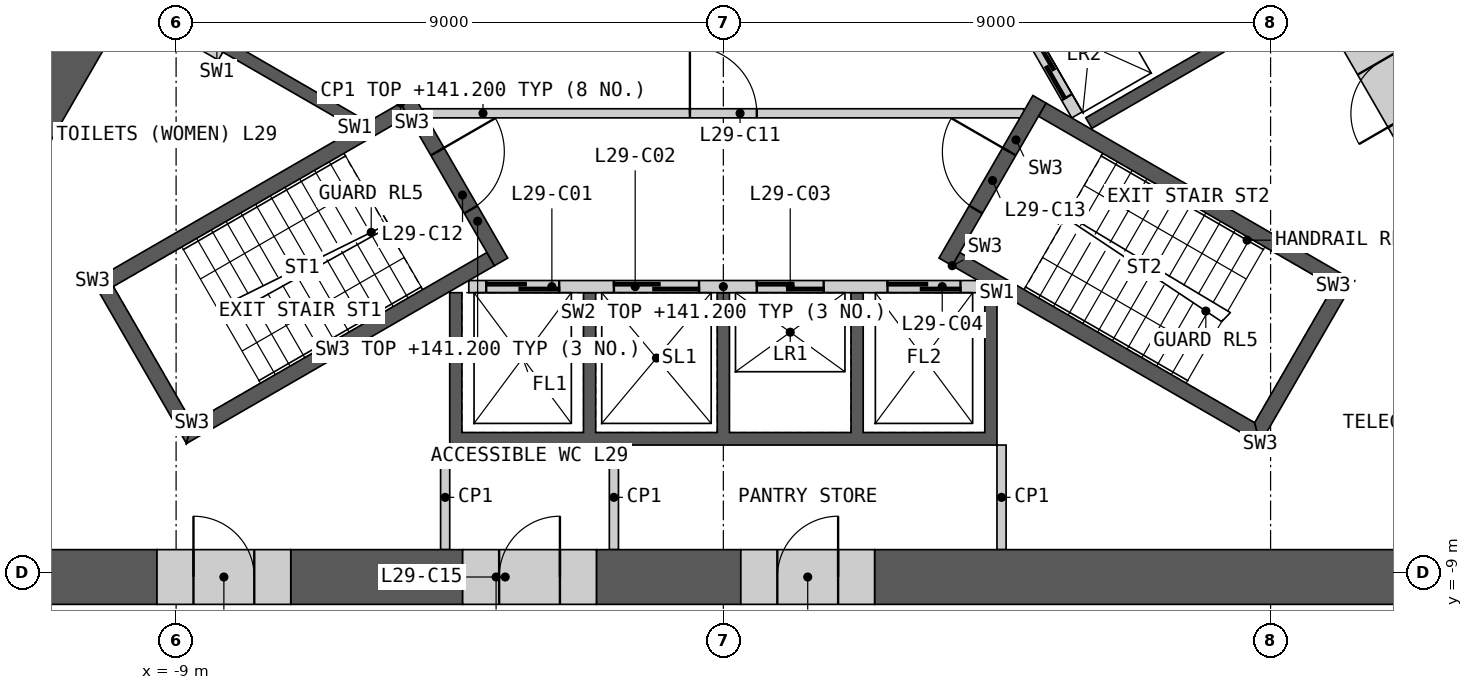
"""IFC4 building model, lengths in metres.
Left out: names, types, materials, properties, quantities, classifications, styles, units other than length and angle.
Written with IfcOpenShell. Run it as: python <this file> out.ifc"""

import sys

from ifc_helpers import new_model, si_unit, direction, frame, frame_2d, origin, place, context, subcontext, project, spatial, polyline, rectangle, outline, extrude, element, fill, save


model = new_model("IFC4")
c1 = context("Model", 3, precision=1e-05, world=origin(), true_north=direction((0.0, 1.0)))
c2 = subcontext(c1, "Body", "Model", "MODEL_VIEW")
j1 = project(units=[si_unit("LENGTHUNIT", "METRE"), si_unit("PLANEANGLEUNIT", "RADIAN")], contexts=[c1])
p1 = place(None, origin())
s1 = spatial("IfcSite", under=j1, at=p1, CompositionType="ELEMENT")
p2 = place(p1, origin())
s2 = spatial("IfcBuilding", under=s1, at=p2, CompositionType="ELEMENT")
p3 = place(p2, frame((0.0, 0.0, 137.4)))
s3 = spatial("IfcBuildingStorey", under=s2, at=p3, CompositionType="ELEMENT", Elevation=137.4)
p4 = place(p3, origin())
e1 = element("IfcWall", 1, at=p4, inside=s3, PredefinedType="SHEAR", context=c2, shape_type="SweptSolid", body=[
    extrude(outline(polyline([(4.5, -4.4), (4.5, -6.906), (-4.5, -6.906), (-4.5, -4.4), (-4.3, -4.4), (-4.3, -6.7), (-2.3, -6.7), (-2.3, -4.4), (-2.1, -4.4), (-2.1, -6.7), (-0.1, -6.7), (-0.1, -4.4), (0.1, -4.4), (0.1, -6.7), (2.1, -6.7), (2.1, -4.4), (2.3, -4.4), (2.3, -6.7), (4.3, -6.7), (4.3, -4.4), (4.5, -4.4)])), origin(), (0.0, 0.0, 1.0), 3.8),
])
p5 = place(p3, frame((-4.187, -4.3, 0.0), z_axis=(0.0, 0.0, 1.0), x_axis=(1.0, 0.0, 0.0)))
e2 = element("IfcWall", 2, at=p5, inside=s3, PredefinedType="SOLIDWALL", context=c2, shape_type="SweptSolid", body=[
    extrude(rectangle(XDim=8.373, YDim=0.2, at=frame_2d((4.187, 0.0))), origin(), (0.0, 0.0, 1.0), 3.8),
])
p6 = place(p5, frame((0.287, 0.0, 0.0)))
e3 = element("IfcOpeningElement", 3, at=p6, cuts=e2, PredefinedType="OPENING", context=c2, shape_type="SweptSolid", body=[
    extrude(rectangle(XDim=1.2, YDim=2.1, at=frame_2d((0.6, 1.05))), frame((0.0, 0.11, 0.0), z_axis=(0.0, -1.0, 0.0), x_axis=(1.0, 0.0, 0.0)), (0.0, 0.0, 1.0), 0.22),
])
p7 = place(p5, frame((2.387, 0.0, 0.0)))
e4 = element("IfcOpeningElement", 4, at=p7, cuts=e2, PredefinedType="OPENING", context=c2, shape_type="SweptSolid", body=[
    extrude(rectangle(XDim=1.4, YDim=2.1, at=frame_2d((0.7, 1.05))), frame((0.0, 0.11, 0.0), z_axis=(0.0, -1.0, 0.0), x_axis=(1.0, 0.0, 0.0)), (0.0, 0.0, 1.0), 0.22),
])
p8 = place(p5, frame((4.737, 0.0, 0.0)))
e5 = element("IfcOpeningElement", 5, at=p8, cuts=e2, PredefinedType="OPENING", context=c2, shape_type="SweptSolid", body=[
    extrude(rectangle(XDim=1.1, YDim=2.1, at=frame_2d((0.55, 1.05))), frame((0.0, 0.11, 0.0), z_axis=(0.0, -1.0, 0.0), x_axis=(1.0, 0.0, 0.0)), (0.0, 0.0, 1.0), 0.22),
])
p9 = place(p5, frame((6.887, 0.0, 0.0)))
e6 = element("IfcOpeningElement", 6, at=p9, cuts=e2, PredefinedType="OPENING", context=c2, shape_type="SweptSolid", body=[
    extrude(rectangle(XDim=1.2, YDim=2.1, at=frame_2d((0.6, 1.05))), frame((0.0, 0.11, 0.0), z_axis=(0.0, -1.0, 0.0), x_axis=(1.0, 0.0, 0.0)), (0.0, 0.0, 1.0), 0.22),
])
p10 = place(p3, origin())
e7 = element("IfcWall", 7, at=p10, inside=s3, PredefinedType="SHEAR", context=c2, shape_type="SweptSolid", body=[
    extrude(outline(polyline([(2.66, 4.192), (4.831, 5.445), (8.231, -0.444), (6.061, -1.697), (5.96, -1.524), (7.952, -0.374), (6.952, 1.358), (4.96, 0.208), (4.861, 0.381), (6.852, 1.531), (5.852, 3.263), (3.861, 2.113), (3.76, 2.287), (5.752, 3.437), (4.752, 5.169), (2.76, 4.019), (2.66, 4.192)])), origin(), (0.0, 0.0, 1.0), 3.8),
])
p11 = place(p3, frame((5.817, -1.476, 0.0), z_axis=(0.0, 0.0, 1.0), x_axis=(-0.500002616675, 0.866023893041, 0.0)))
e8 = element("IfcWall", 8, at=p11, inside=s3, PredefinedType="SOLIDWALL", context=c2, shape_type="SweptSolid", body=[
    extrude(rectangle(XDim=8.373, YDim=0.2, at=frame_2d((4.187, 0.0))), origin(), (0.0, 0.0, 1.0), 3.8),
])
p12 = place(p11, frame((0.337, 0.0, 0.0)))
e9 = element("IfcOpeningElement", 9, at=p12, cuts=e8, PredefinedType="OPENING", context=c2, shape_type="SweptSolid", body=[
    extrude(rectangle(XDim=1.1, YDim=2.1, at=frame_2d((0.55, 1.05))), frame((0.0, 0.11, 0.0), z_axis=(0.0, -1.0, 0.0), x_axis=(1.0, 0.0, 0.0)), (0.0, 0.0, 1.0), 0.22),
])
p13 = place(p11, frame((2.537, 0.0, 0.0)))
e10 = element("IfcOpeningElement", 10, at=p13, cuts=e8, PredefinedType="OPENING", context=c2, shape_type="SweptSolid", body=[
    extrude(rectangle(XDim=1.1, YDim=2.1, at=frame_2d((0.55, 1.05))), frame((0.0, 0.11, 0.0), z_axis=(0.0, -1.0, 0.0), x_axis=(1.0, 0.0, 0.0)), (0.0, 0.0, 1.0), 0.22),
])
p14 = place(p11, frame((4.737, 0.0, 0.0)))
e11 = element("IfcOpeningElement", 11, at=p14, cuts=e8, PredefinedType="OPENING", context=c2, shape_type="SweptSolid", body=[
    extrude(rectangle(XDim=1.1, YDim=2.1, at=frame_2d((0.55, 1.05))), frame((0.0, 0.11, 0.0), z_axis=(0.0, -1.0, 0.0), x_axis=(1.0, 0.0, 0.0)), (0.0, 0.0, 1.0), 0.22),
])
p15 = place(p11, frame((7.037, 0.0, 0.0)))
e12 = element("IfcOpeningElement", 12, at=p15, cuts=e8, PredefinedType="OPENING", context=c2, shape_type="SweptSolid", body=[
    extrude(rectangle(XDim=0.9, YDim=2.1, at=frame_2d((0.45, 1.05))), frame((0.0, 0.11, 0.0), z_axis=(0.0, -1.0, 0.0), x_axis=(1.0, 0.0, 0.0)), (0.0, 0.0, 1.0), 0.22),
])
p16 = place(p3, origin())
e13 = element("IfcWall", 13, at=p16, inside=s3, PredefinedType="SHEAR", context=c2, shape_type="SweptSolid", body=[
    extrude(outline(polyline([(-6.061, -1.697), (-8.231, -0.444), (-8.131, -0.271), (-5.96, -1.524), (-6.061, -1.697)])), origin(), (0.0, 0.0, 1.0), 3.8),
])
p17 = place(p3, frame((-4.941, -1.45, 0.0), z_axis=(0.0, 0.0, 1.0), x_axis=(1.0, 0.0, 0.0)))
e14 = element("IfcWall", 14, at=p17, inside=s3, PredefinedType="PARTITIONING", context=c2, shape_type="SweptSolid", body=[
    extrude(rectangle(XDim=9.882, YDim=0.15, at=frame_2d((4.941, 0.0))), origin(), (0.0, 0.0, 1.0), 3.8),
])
p18 = place(p17, frame((4.391, 0.0, 0.0)))
e15 = element("IfcOpeningElement", 15, at=p18, cuts=e14, PredefinedType="OPENING", context=c2, shape_type="SweptSolid", body=[
    extrude(rectangle(XDim=1.1, YDim=2.1, at=frame_2d((0.55, 1.05))), frame((0.0, 0.085, 0.0), z_axis=(0.0, -1.0, 0.0), x_axis=(1.0, 0.0, 0.0)), (0.0, 0.0, 1.0), 0.17),
])
p19 = place(p3, origin())
e16 = element("IfcWall", 16, at=p19, inside=s3, PredefinedType="SHEAR", context=c2, shape_type="SweptSolid", body=[
    extrude(outline(polyline([(-5.307, -1.281), (-10.374, -4.206), (-10.032, -4.298), (-5.182, -1.498), (-5.307, -1.281)])), origin(), (0.0, 0.0, 1.0), 3.8),
])
p20 = place(p3, origin())
e17 = element("IfcWall", 17, at=p20, inside=s3, PredefinedType="SHEAR", context=c2, shape_type="SweptSolid", body=[
    extrude(outline(polyline([(-10.374, -4.206), (-8.83, -6.881), (-8.738, -6.539), (-10.032, -4.298), (-10.374, -4.206)])), origin(), (0.0, 0.0, 1.0), 3.8),
])
p21 = place(p3, origin())
e18 = element("IfcWall", 18, at=p21, inside=s3, PredefinedType="SHEAR", context=c2, shape_type="SweptSolid", body=[
    extrude(outline(polyline([(-8.738, -6.539), (-8.83, -6.881), (-3.763, -3.956), (-3.888, -3.739), (-8.738, -6.539)])), origin(), (0.0, 0.0, 1.0), 3.8),
])
p22 = place(p3, frame((-5.199, -1.219, 0.0), z_axis=(0.0, 0.0, 1.0), x_axis=(0.499982516597, -0.866035497597, 0.0)))
e19 = element("IfcWall", 19, at=p22, inside=s3, PredefinedType="SHEAR", context=c2, shape_type="SweptSolid", body=[
    extrude(rectangle(XDim=3.088, YDim=0.25, at=frame_2d((1.544, 0.0))), origin(), (0.0, 0.0, 1.0), 3.8),
])
p23 = place(p22, frame((0.994, 0.0, 0.0)))
e20 = element("IfcOpeningElement", 20, at=p23, cuts=e19, PredefinedType="OPENING", context=c2, shape_type="SweptSolid", body=[
    extrude(rectangle(XDim=1.1, YDim=2.1, at=frame_2d((0.55, 1.05))), frame((0.0, 0.135, 0.0), z_axis=(0.0, -1.0, 0.0), x_axis=(1.0, 0.0, 0.0)), (0.0, 0.0, 1.0), 0.27),
])
p24 = place(p3, origin())
e21 = element("IfcWall", 21, at=p24, inside=s3, PredefinedType="SHEAR", context=c2, shape_type="SweptSolid", body=[
    extrude(outline(polyline([(3.763, -3.956), (8.83, -6.881), (8.738, -6.539), (3.888, -3.739), (3.763, -3.956)])), origin(), (0.0, 0.0, 1.0), 3.8),
])
p25 = place(p3, origin())
e22 = element("IfcWall", 22, at=p25, inside=s3, PredefinedType="SHEAR", context=c2, shape_type="SweptSolid", body=[
    extrude(outline(polyline([(8.83, -6.881), (10.374, -4.206), (10.032, -4.298), (8.738, -6.539), (8.83, -6.881)])), origin(), (0.0, 0.0, 1.0), 3.8),
])
p26 = place(p3, origin())
e23 = element("IfcWall", 23, at=p26, inside=s3, PredefinedType="SHEAR", context=c2, shape_type="SweptSolid", body=[
    extrude(outline(polyline([(10.032, -4.298), (10.374, -4.206), (5.307, -1.281), (5.182, -1.498), (10.032, -4.298)])), origin(), (0.0, 0.0, 1.0), 3.8),
])
p27 = place(p3, frame((3.655, -3.893, 0.0), z_axis=(0.0, 0.0, 1.0), x_axis=(0.499982516597, 0.866035497597, 0.0)))
e24 = element("IfcWall", 24, at=p27, inside=s3, PredefinedType="SHEAR", context=c2, shape_type="SweptSolid", body=[
    extrude(rectangle(XDim=3.088, YDim=0.25, at=frame_2d((1.544, 0.0))), origin(), (0.0, 0.0, 1.0), 3.8),
])
p28 = place(p27, frame((0.994, 0.0, 0.0)))
e25 = element("IfcOpeningElement", 25, at=p28, cuts=e24, PredefinedType="OPENING", context=c2, shape_type="SweptSolid", body=[
    extrude(rectangle(XDim=1.1, YDim=2.1, at=frame_2d((0.55, 1.05))), frame((0.0, 0.135, 0.0), z_axis=(0.0, -1.0, 0.0), x_axis=(1.0, 0.0, 0.0)), (0.0, 0.0, 1.0), 0.27),
])
for number, where, z_axis, x_axis in (
    (26, (-8.268, -0.509, 0.0), (0.0, 0.0, 1.0), (-0.866, 0.5, 0.0)),
    (27, (4.575, -6.906, 0.0), (0.0, 0.0, 1.0), (0.0, -1.0, 0.0)),
    (28, (-4.575, -6.906, 0.0), (0.0, 0.0, 1.0), (0.0, -1.0, 0.0)),
    (29, (-1.8, -8.626, 0.0), (0.0, 0.0, 1.0), (0.0, 1.0, 0.0)),
):
    element("IfcWall", number, at=place(p3, frame(where, z_axis=z_axis, x_axis=x_axis)), inside=s3, PredefinedType="PARTITIONING", context=c2, shape_type="SweptSolid", body=[
        extrude(rectangle(XDim=1.72, YDim=0.15, at=frame_2d((0.86, 0.0))), origin(), (0.0, 0.0, 1.0), 3.8),
    ])
p29 = place(p3, frame((2.488, -9.076, 0.0), z_axis=(0.0, 0.0, 1.0), x_axis=(1.0, 0.0, 0.0)))
e30 = element("IfcWall", 30, at=p29, inside=s3, PredefinedType="SHEAR", context=c2, shape_type="SweptSolid", body=[
    extrude(rectangle(XDim=12.454, YDim=0.9, at=frame_2d((6.227, 0.0))), origin(), (0.0, 0.0, 1.0), 3.8),
])
p30 = place(p3, frame((-14.941, -9.076, 0.0), z_axis=(0.0, 0.0, 1.0), x_axis=(1.0, 0.0, 0.0)))
e31 = element("IfcWall", 31, at=p30, inside=s3, PredefinedType="SHEAR", context=c2, shape_type="SweptSolid", body=[
    extrude(rectangle(XDim=5.627, YDim=0.9, at=frame_2d((2.813, 0.0))), origin(), (0.0, 0.0, 1.0), 3.8),
])
p31 = place(p3, frame((-7.115, -9.076, 0.0), z_axis=(0.0, 0.0, 1.0), x_axis=(1.0, 0.0, 0.0)))
e32 = element("IfcWall", 32, at=p31, inside=s3, PredefinedType="SHEAR", context=c2, shape_type="SweptSolid", body=[
    extrude(rectangle(XDim=2.827, YDim=0.9, at=frame_2d((1.414, 0.0))), origin(), (0.0, 0.0, 1.0), 3.8),
])
p32 = place(p3, frame((-2.087, -9.076, 0.0), z_axis=(0.0, 0.0, 1.0), x_axis=(1.0, 0.0, 0.0)))
e33 = element("IfcWall", 33, at=p32, inside=s3, PredefinedType="SHEAR", context=c2, shape_type="SweptSolid", body=[
    extrude(rectangle(XDim=2.375, YDim=0.9, at=frame_2d((1.188, 0.0))), origin(), (0.0, 0.0, 1.0), 3.8),
])
p33 = place(p3, frame((-10.06, 0.728, 0.0), z_axis=(0.0, 0.0, 1.0), x_axis=(-0.500002975332, -0.866023685969, 0.0)))
e34 = element("IfcWall", 34, at=p33, inside=s3, PredefinedType="SHEAR", context=c2, shape_type="SweptSolid", body=[
    extrude(rectangle(XDim=6.429, YDim=0.9, at=frame_2d((3.214, 0.0))), origin(), (0.0, 0.0, 1.0), 3.8),
])
p34 = place(p3, frame((-4.288, -9.076, 0.0), z_axis=(0.0, 0.0, 1.0), x_axis=(1.0, 0.0, 0.0)))
e35 = element("IfcWall", 35, at=p34, inside=s3, PredefinedType="SHEAR", context=c2, shape_type="SweptSolid", body=[
    extrude(rectangle(XDim=2.2, YDim=0.9, at=frame_2d((1.1, 0.0))), origin(), (0.0, 0.0, 1.0), 3.8),
])
p35 = place(p34, frame((0.6, 0.0, 0.0)))
e36 = element("IfcOpeningElement", 36, at=p35, cuts=e35, PredefinedType="OPENING", context=c2, shape_type="SweptSolid", body=[
    extrude(rectangle(XDim=1.0, YDim=2.1, at=frame_2d((0.5, 1.05))), frame((0.0, 0.46, 0.0), z_axis=(0.0, -1.0, 0.0), x_axis=(1.0, 0.0, 0.0)), (0.0, 0.0, 1.0), 0.92),
])
p36 = place(p3, frame((0.288, -9.076, 0.0), z_axis=(0.0, 0.0, 1.0), x_axis=(1.0, 0.0, 0.0)))
e37 = element("IfcWall", 37, at=p36, inside=s3, PredefinedType="SHEAR", context=c2, shape_type="SweptSolid", body=[
    extrude(rectangle(XDim=2.2, YDim=0.9, at=frame_2d((1.1, 0.0))), origin(), (0.0, 0.0, 1.0), 3.8),
])
p37 = place(p36, frame((0.6, 0.0, 0.0)))
e38 = element("IfcOpeningElement", 38, at=p37, cuts=e37, PredefinedType="OPENING", context=c2, shape_type="SweptSolid", body=[
    extrude(rectangle(XDim=1.0, YDim=2.1, at=frame_2d((0.5, 1.05))), frame((0.0, 0.46, 0.0), z_axis=(0.0, -1.0, 0.0), x_axis=(1.0, 0.0, 0.0)), (0.0, 0.0, 1.0), 0.92),
])
p38 = place(p3, frame((-9.314, -9.076, 0.0), z_axis=(0.0, 0.0, 1.0), x_axis=(1.0, 0.0, 0.0)))
e39 = element("IfcWall", 39, at=p38, inside=s3, PredefinedType="SHEAR", context=c2, shape_type="SweptSolid", body=[
    extrude(rectangle(XDim=2.2, YDim=0.9, at=frame_2d((1.1, 0.0))), origin(), (0.0, 0.0, 1.0), 3.8),
])
p39 = place(p38, frame((0.6, 0.0, 0.0)))
e40 = element("IfcOpeningElement", 40, at=p39, cuts=e39, PredefinedType="OPENING", context=c2, shape_type="SweptSolid", body=[
    extrude(rectangle(XDim=1.0, YDim=2.1, at=frame_2d((0.5, 1.05))), frame((0.0, 0.46, 0.0), z_axis=(0.0, -1.0, 0.0), x_axis=(1.0, 0.0, 0.0)), (0.0, 0.0, 1.0), 0.92),
])
p40 = place(p3, frame((11.621, -1.975, 0.0), z_axis=(0.0, 0.0, 1.0), x_axis=(-0.50002983664, 0.866008176907, 0.0)))
e41 = element("IfcWall", 41, at=p40, inside=s3, PredefinedType="SHEAR", context=c2, shape_type="SweptSolid", body=[
    extrude(rectangle(XDim=2.2, YDim=0.9, at=frame_2d((1.1, 0.0))), origin(), (0.0, 0.0, 1.0), 3.8),
])
p41 = place(p40, frame((0.6, 0.0, 0.0)))
e42 = element("IfcOpeningElement", 42, at=p41, cuts=e41, PredefinedType="OPENING", context=c2, shape_type="SweptSolid", body=[
    extrude(rectangle(XDim=1.0, YDim=2.1, at=frame_2d((0.5, 1.05))), frame((0.0, 0.46, 0.0), z_axis=(0.0, -1.0, 0.0), x_axis=(1.0, 0.0, 0.0)), (0.0, 0.0, 1.0), 0.92),
])
p42 = place(p3, frame((10.46, 5.736, 0.0), z_axis=(0.0, 0.0, 1.0), x_axis=(0.500004141693, -0.866023012564, 0.0)))
e43 = element("IfcWall", 43, at=p42, inside=s3, PredefinedType="PARTITIONING", context=c2, shape_type="SweptSolid", body=[
    extrude(rectangle(XDim=9.803, YDim=0.2, at=frame_2d((4.902, 0.0))), origin(), (0.0, 0.0, 1.0), 3.8),
])
p43 = place(p42, frame((6.853, 0.0, 0.0)))
e44 = element("IfcOpeningElement", 44, at=p43, cuts=e43, PredefinedType="OPENING", context=c2, shape_type="SweptSolid", body=[
    extrude(rectangle(XDim=1.0, YDim=2.1, at=frame_2d((0.5, 1.05))), frame((0.0, 0.11, 0.0), z_axis=(0.0, -1.0, 0.0), x_axis=(1.0, 0.0, 0.0)), (0.0, 0.0, 1.0), 0.22),
])
p44 = place(p3, frame((-15.361, -2.754, 0.0), z_axis=(0.0, 0.0, 1.0), x_axis=(0.500004141693, 0.866023012564, 0.0)))
e45 = element("IfcWall", 45, at=p44, inside=s3, PredefinedType="PARTITIONING", context=c2, shape_type="SweptSolid", body=[
    extrude(rectangle(XDim=9.803, YDim=0.2, at=frame_2d((4.902, 0.0))), origin(), (0.0, 0.0, 1.0), 3.8),
])
p45 = place(p44, frame((4.452, 0.0, 0.0)))
e46 = element("IfcOpeningElement", 46, at=p45, cuts=e45, PredefinedType="OPENING", context=c2, shape_type="SweptSolid", body=[
    extrude(rectangle(XDim=1.0, YDim=2.1, at=frame_2d((0.5, 1.05))), frame((0.0, 0.11, 0.0), z_axis=(0.0, -1.0, 0.0), x_axis=(1.0, 0.0, 0.0)), (0.0, 0.0, 1.0), 0.22),
])
p46 = place(p6, origin())
e47 = element("IfcDoor", 47, at=p46, inside=s3, OperationType="SLIDING_TO_LEFT", PredefinedType="DOOR", context=c2, shape_type="SweptSolid", body=[
    extrude(rectangle(XDim=1.2, YDim=2.1, at=frame_2d((0.6, 1.05))), frame((0.0, 0.025, 0.0), z_axis=(0.0, -1.0, 0.0), x_axis=(1.0, 0.0, 0.0)), (0.0, 0.0, 1.0), 0.05),
])
fill(e3, e47)
p47 = place(p7, origin())
e48 = element("IfcDoor", 48, at=p47, inside=s3, OperationType="SLIDING_TO_LEFT", PredefinedType="DOOR", context=c2, shape_type="SweptSolid", body=[
    extrude(rectangle(XDim=1.4, YDim=2.1, at=frame_2d((0.7, 1.05))), frame((0.0, 0.025, 0.0), z_axis=(0.0, -1.0, 0.0), x_axis=(1.0, 0.0, 0.0)), (0.0, 0.0, 1.0), 0.05),
])
fill(e4, e48)
p48 = place(p8, origin())
e49 = element("IfcDoor", 49, at=p48, inside=s3, OperationType="SLIDING_TO_LEFT", PredefinedType="DOOR", context=c2, shape_type="SweptSolid", body=[
    extrude(rectangle(XDim=1.1, YDim=2.1, at=frame_2d((0.55, 1.05))), frame((0.0, 0.025, 0.0), z_axis=(0.0, -1.0, 0.0), x_axis=(1.0, 0.0, 0.0)), (0.0, 0.0, 1.0), 0.05),
])
fill(e5, e49)
p49 = place(p9, origin())
e50 = element("IfcDoor", 50, at=p49, inside=s3, OperationType="SLIDING_TO_LEFT", PredefinedType="DOOR", context=c2, shape_type="SweptSolid", body=[
    extrude(rectangle(XDim=1.2, YDim=2.1, at=frame_2d((0.6, 1.05))), frame((0.0, 0.025, 0.0), z_axis=(0.0, -1.0, 0.0), x_axis=(1.0, 0.0, 0.0)), (0.0, 0.0, 1.0), 0.05),
])
fill(e6, e50)
p50 = place(p12, origin())
e51 = element("IfcDoor", 51, at=p50, inside=s3, OperationType="SLIDING_TO_LEFT", PredefinedType="DOOR", context=c2, shape_type="SweptSolid", body=[
    extrude(rectangle(XDim=1.1, YDim=2.1, at=frame_2d((0.55, 1.05))), frame((0.0, 0.025, 0.0), z_axis=(0.0, -1.0, 0.0), x_axis=(1.0, 0.0, 0.0)), (0.0, 0.0, 1.0), 0.05),
])
fill(e9, e51)
p51 = place(p18, origin())
e52 = element("IfcDoor", 52, at=p51, inside=s3, OperationType="SINGLE_SWING_LEFT", PredefinedType="DOOR", context=c2, shape_type="SweptSolid", body=[
    extrude(rectangle(XDim=1.1, YDim=2.1, at=frame_2d((0.55, 1.05))), frame((0.0, 0.025, 0.0), z_axis=(0.0, -1.0, 0.0), x_axis=(1.0, 0.0, 0.0)), (0.0, 0.0, 1.0), 0.05),
])
fill(e15, e52)
p52 = place(p23, origin())
e53 = element("IfcDoor", 53, at=p52, inside=s3, OperationType="SINGLE_SWING_LEFT", PredefinedType="DOOR", context=c2, shape_type="SweptSolid", body=[
    extrude(rectangle(XDim=1.1, YDim=2.1, at=frame_2d((0.55, 1.05))), frame((0.0, 0.025, 0.0), z_axis=(0.0, -1.0, 0.0), x_axis=(1.0, 0.0, 0.0)), (0.0, 0.0, 1.0), 0.05),
])
fill(e20, e53)
p53 = place(p28, origin())
e54 = element("IfcDoor", 54, at=p53, inside=s3, OperationType="SINGLE_SWING_RIGHT", PredefinedType="DOOR", context=c2, shape_type="SweptSolid", body=[
    extrude(rectangle(XDim=1.1, YDim=2.1, at=frame_2d((0.55, 1.05))), frame((0.0, 0.025, 0.0), z_axis=(0.0, -1.0, 0.0), x_axis=(1.0, 0.0, 0.0)), (0.0, 0.0, 1.0), 0.05),
])
fill(e25, e54)
p54 = place(p35, origin())
e55 = element("IfcDoor", 55, at=p54, inside=s3, OperationType="SINGLE_SWING_RIGHT", PredefinedType="DOOR", context=c2, shape_type="SweptSolid", body=[
    extrude(rectangle(XDim=1.0, YDim=2.1, at=frame_2d((0.5, 1.05))), frame((0.0, 0.205, 0.0), z_axis=(0.0, -1.0, 0.0), x_axis=(1.0, 0.0, 0.0)), (0.0, 0.0, 1.0), 0.05),
])
fill(e36, e55)
p55 = place(p37, origin())
e56 = element("IfcDoor", 56, at=p55, inside=s3, OperationType="SINGLE_SWING_RIGHT", PredefinedType="DOOR", context=c2, shape_type="SweptSolid", body=[
    extrude(rectangle(XDim=1.0, YDim=2.1, at=frame_2d((0.5, 1.05))), frame((0.0, 0.205, 0.0), z_axis=(0.0, -1.0, 0.0), x_axis=(1.0, 0.0, 0.0)), (0.0, 0.0, 1.0), 0.05),
])
fill(e38, e56)
p56 = place(p39, origin())
e57 = element("IfcDoor", 57, at=p56, inside=s3, OperationType="SINGLE_SWING_LEFT", PredefinedType="DOOR", context=c2, shape_type="SweptSolid", body=[
    extrude(rectangle(XDim=1.0, YDim=2.1, at=frame_2d((0.5, 1.05))), frame((0.0, 0.205, 0.0), z_axis=(0.0, -1.0, 0.0), x_axis=(1.0, 0.0, 0.0)), (0.0, 0.0, 1.0), 0.05),
])
fill(e40, e57)
p57 = place(p41, origin())
e58 = element("IfcDoor", 58, at=p57, inside=s3, OperationType="SINGLE_SWING_LEFT", PredefinedType="DOOR", context=c2, shape_type="SweptSolid", body=[
    extrude(rectangle(XDim=1.0, YDim=2.1, at=frame_2d((0.5, 1.05))), frame((0.0, 0.205, 0.0), z_axis=(0.0, -1.0, 0.0), x_axis=(1.0, 0.0, 0.0)), (0.0, 0.0, 1.0), 0.05),
])
fill(e42, e58)
save(model, sys.argv[1])
